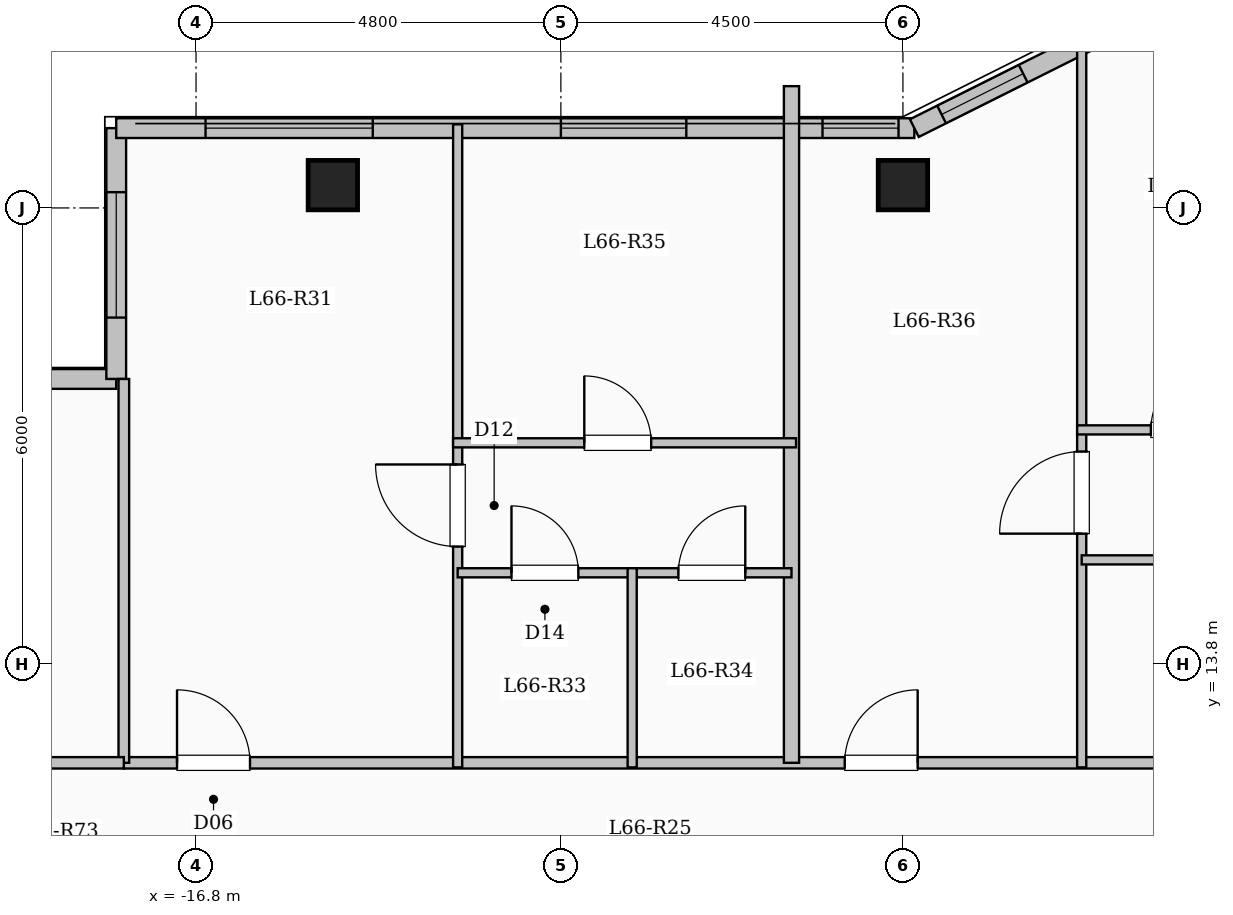
"""IFC4 building model, lengths in metres.
Left out: names, types, materials, properties, quantities, classifications, styles, units other than length and angle.
Written with IfcOpenShell. Run it as: python <this file> out.ifc"""

import sys

from ifc_helpers import new_model, si_unit, direction, frame, frame_2d, origin, origin_2d, place, context, subcontext, project, spatial, rectangle, extrude, element, fill, save


model = new_model("IFC4")
c1 = context("Model", 3, precision=1e-05, world=origin(), true_north=direction((0.0, 1.0)))
c2 = subcontext(c1, "Body", "Model", "MODEL_VIEW")
j1 = project(units=[si_unit("LENGTHUNIT", "METRE"), si_unit("PLANEANGLEUNIT", "RADIAN")], contexts=[c1])
p1 = place(None, origin())
s1 = spatial("IfcSite", under=j1, at=p1, CompositionType="ELEMENT")
p2 = place(p1, origin())
s2 = spatial("IfcBuilding", under=s1, at=p2, CompositionType="ELEMENT")
p3 = place(p2, frame((0.0, 0.0, 244.85)))
s3 = spatial("IfcBuildingStorey", under=s2, at=p3, CompositionType="ELEMENT", Elevation=244.85)
for number, where, z_axis, x_axis in (
    (1, (-15.0, 20.1, 0.0), (0.0, 0.0, 1.0), (1.0, 0.0, 0.0)),
    (2, (-7.5, 20.1, 0.0), (0.0, 0.0, 1.0), (1.0, 0.0, 0.0)),
):
    element("IfcColumn", number, at=place(p3, frame(where, z_axis=z_axis, x_axis=x_axis)), inside=s3, PredefinedType="COLUMN", context=c2, shape_type="SweptSolid", body=[
        extrude(rectangle(XDim=0.65, YDim=0.65, at=origin_2d()), origin(), (0.0, 0.0, 1.0), 3.35),
    ])
p4 = place(p3, frame((-22.65, 17.55, 0.0), z_axis=(0.0, 0.0, 1.0), x_axis=(1.0, 0.0, 0.0)))
e3 = element("IfcWall", 3, at=p4, inside=s3, PredefinedType="SOLIDWALL", context=c2, shape_type="SweptSolid", body=[
    extrude(rectangle(XDim=4.8, YDim=0.26, at=frame_2d((2.4, 0.0))), origin(), (0.0, 0.0, 1.0), 3.1),
])
p5 = place(p4, frame((1.425, 0.0, 0.9)))
e4 = element("IfcOpeningElement", 4, at=p5, cuts=e3, PredefinedType="OPENING", context=c2, shape_type="SweptSolid", body=[
    extrude(rectangle(XDim=2.0, YDim=1.7, at=frame_2d((1.0, 0.85))), frame((0.0, 0.14, 0.0), z_axis=(0.0, -1.0, 0.0), x_axis=(1.0, 0.0, 0.0)), (0.0, 0.0, 1.0), 0.28),
])
p6 = place(p3, frame((-17.85, 17.55, 0.0), z_axis=(0.0, 0.0, 1.0), x_axis=(0.0, 1.0, 0.0)))
e5 = element("IfcWall", 5, at=p6, inside=s3, PredefinedType="SOLIDWALL", context=c2, shape_type="SweptSolid", body=[
    extrude(rectangle(XDim=3.3, YDim=0.26, at=frame_2d((1.65, 0.0))), origin(), (0.0, 0.0, 1.0), 3.1),
])
p7 = place(p6, frame((0.808, 0.0, 0.9)))
e6 = element("IfcOpeningElement", 6, at=p7, cuts=e5, PredefinedType="OPENING", context=c2, shape_type="SweptSolid", body=[
    extrude(rectangle(XDim=1.65, YDim=1.6, at=frame_2d((0.825, 0.8))), frame((0.0, 0.14, 0.0), z_axis=(0.0, -1.0, 0.0), x_axis=(1.0, 0.0, 0.0)), (0.0, 0.0, 1.0), 0.28),
])
p8 = place(p3, frame((-17.85, 20.85, 0.0), z_axis=(0.0, 0.0, 1.0), x_axis=(1.0, 0.0, 0.0)))
e7 = element("IfcWall", 7, at=p8, inside=s3, PredefinedType="SOLIDWALL", context=c2, shape_type="SweptSolid", body=[
    extrude(rectangle(XDim=10.5, YDim=0.26, at=frame_2d((5.25, 0.0))), origin(), (0.0, 0.0, 1.0), 3.1),
])
p9 = place(p8, frame((1.175, 0.0, 0.9)))
e8 = element("IfcOpeningElement", 8, at=p9, cuts=e7, PredefinedType="OPENING", context=c2, shape_type="SweptSolid", body=[
    extrude(rectangle(XDim=2.2, YDim=1.75, at=frame_2d((1.1, 0.875))), frame((0.0, 0.14, 0.0), z_axis=(0.0, -1.0, 0.0), x_axis=(1.0, 0.0, 0.0)), (0.0, 0.0, 1.0), 0.28),
])
p10 = place(p8, frame((5.85, 0.0, 0.9)))
e9 = element("IfcOpeningElement", 9, at=p10, cuts=e7, PredefinedType="OPENING", context=c2, shape_type="SweptSolid", body=[
    extrude(rectangle(XDim=1.65, YDim=1.6, at=frame_2d((0.825, 0.8))), frame((0.0, 0.14, 0.0), z_axis=(0.0, -1.0, 0.0), x_axis=(1.0, 0.0, 0.0)), (0.0, 0.0, 1.0), 0.28),
])
p11 = place(p8, frame((9.292, 0.0, 0.95)))
e10 = element("IfcOpeningElement", 10, at=p11, cuts=e7, PredefinedType="OPENING", context=c2, shape_type="SweptSolid", body=[
    extrude(rectangle(XDim=1.0, YDim=1.5, at=frame_2d((0.5, 0.75))), frame((0.0, 0.14, 0.0), z_axis=(0.0, -1.0, 0.0), x_axis=(1.0, 0.0, 0.0)), (0.0, 0.0, 1.0), 0.28),
])
p12 = place(p3, frame((-7.35, 20.85, 0.0), z_axis=(0.0, 0.0, 1.0), x_axis=(0.894427191, 0.4472135955, 0.0)))
e11 = element("IfcWall", 11, at=p12, inside=s3, PredefinedType="SOLIDWALL", context=c2, shape_type="SweptSolid", body=[
    extrude(rectangle(XDim=3.354, YDim=0.26, at=frame_2d((1.677, 0.0))), origin(), (0.0, 0.0, 1.0), 3.1),
])
p13 = place(p12, frame((0.401, 0.0, 0.95)))
e12 = element("IfcOpeningElement", 12, at=p13, cuts=e11, PredefinedType="OPENING", context=c2, shape_type="SweptSolid", body=[
    extrude(rectangle(XDim=1.2, YDim=1.5, at=frame_2d((0.6, 0.75))), frame((0.0, 0.14, 0.0), z_axis=(0.0, -1.0, 0.0), x_axis=(1.0, 0.0, 0.0)), (0.0, 0.0, 1.0), 0.28),
])
p14 = place(p3, frame((-17.75, 12.5, 0.0), z_axis=(0.0, 0.0, 1.0), x_axis=(1.0, 0.0, 0.0)))
e13 = element("IfcWall", 13, at=p14, inside=s3, PredefinedType="PARTITIONING", context=c2, shape_type="SweptSolid", body=[
    extrude(rectangle(XDim=13.9, YDim=0.15, at=frame_2d((6.95, 0.0))), origin(), (0.0, 0.0, 1.0), 3.1),
])
p15 = place(p14, frame((0.7, 0.0, 0.0)))
e14 = element("IfcOpeningElement", 14, at=p15, cuts=e13, PredefinedType="OPENING", context=c2, shape_type="SweptSolid", body=[
    extrude(rectangle(XDim=0.96, YDim=2.15, at=frame_2d((0.48, 1.075))), frame((0.0, 0.085, 0.0), z_axis=(0.0, -1.0, 0.0), x_axis=(1.0, 0.0, 0.0)), (0.0, 0.0, 1.0), 0.17),
])
p16 = place(p14, frame((9.484, 0.0, 0.0)))
e15 = element("IfcOpeningElement", 15, at=p16, cuts=e13, PredefinedType="OPENING", context=c2, shape_type="SweptSolid", body=[
    extrude(rectangle(XDim=0.96, YDim=2.15, at=frame_2d((0.48, 1.075))), frame((0.0, 0.085, 0.0), z_axis=(0.0, -1.0, 0.0), x_axis=(1.0, 0.0, 0.0)), (0.0, 0.0, 1.0), 0.17),
])
p17 = place(p3, frame((-8.966, 12.5, 0.0), z_axis=(0.0, 0.0, 1.0), x_axis=(0.0, 1.0, 0.0)))
e16 = element("IfcWall", 16, at=p17, inside=s3, PredefinedType="SOLIDWALL", context=c2, shape_type="SweptSolid", body=[
    extrude(rectangle(XDim=8.902, YDim=0.2, at=frame_2d((4.451, 0.0))), origin(), (0.0, 0.0, 1.0), 3.1),
])
p18 = place(p3, frame((-13.358, 12.44, 0.0), z_axis=(0.0, 0.0, 1.0), x_axis=(0.0, 1.0, 0.0)))
e17 = element("IfcWall", 17, at=p18, inside=s3, PredefinedType="PARTITIONING", context=c2, shape_type="SweptSolid", body=[
    extrude(rectangle(XDim=8.46, YDim=0.12, at=frame_2d((4.23, 0.0))), origin(), (0.0, 0.0, 1.0), 3.1),
])
p19 = place(p18, frame((2.905, 0.0, 0.0)))
e18 = element("IfcOpeningElement", 18, at=p19, cuts=e17, PredefinedType="OPENING", context=c2, shape_type="SweptSolid", body=[
    extrude(rectangle(XDim=1.08, YDim=2.15, at=frame_2d((0.54, 1.075))), frame((0.0, 0.07, 0.0), z_axis=(0.0, -1.0, 0.0), x_axis=(1.0, 0.0, 0.0)), (0.0, 0.0, 1.0), 0.14),
])
p20 = place(p3, frame((-13.358, 15.0, 0.0), z_axis=(0.0, 0.0, 1.0), x_axis=(1.0, 0.0, 0.0)))
e19 = element("IfcWall", 19, at=p20, inside=s3, PredefinedType="PARTITIONING", context=c2, shape_type="SweptSolid", body=[
    extrude(rectangle(XDim=2.296, YDim=0.12, at=frame_2d((1.148, 0.0))), origin(), (0.0, 0.0, 1.0), 3.1),
])
p21 = place(p20, frame((0.708, 0.0, 0.0)))
e20 = element("IfcOpeningElement", 20, at=p21, cuts=e19, PredefinedType="OPENING", context=c2, shape_type="SweptSolid", body=[
    extrude(rectangle(XDim=0.88, YDim=2.1, at=frame_2d((0.44, 1.05))), frame((0.0, 0.07, 0.0), z_axis=(0.0, -1.0, 0.0), x_axis=(1.0, 0.0, 0.0)), (0.0, 0.0, 1.0), 0.14),
])
p22 = place(p3, frame((-11.062, 15.0, 0.0), z_axis=(0.0, 0.0, 1.0), x_axis=(1.0, 0.0, 0.0)))
e21 = element("IfcWall", 21, at=p22, inside=s3, PredefinedType="PARTITIONING", context=c2, shape_type="SweptSolid", body=[
    extrude(rectangle(XDim=2.096, YDim=0.12, at=frame_2d((1.048, 0.0))), origin(), (0.0, 0.0, 1.0), 3.1),
])
p23 = place(p22, frame((0.608, 0.0, 0.0)))
e22 = element("IfcOpeningElement", 22, at=p23, cuts=e21, PredefinedType="OPENING", context=c2, shape_type="SweptSolid", body=[
    extrude(rectangle(XDim=0.88, YDim=2.1, at=frame_2d((0.44, 1.05))), frame((0.0, 0.07, 0.0), z_axis=(0.0, -1.0, 0.0), x_axis=(1.0, 0.0, 0.0)), (0.0, 0.0, 1.0), 0.14),
])
p24 = place(p3, frame((-13.418, 16.71, 0.0), z_axis=(0.0, 0.0, 1.0), x_axis=(1.0, 0.0, 0.0)))
e23 = element("IfcWall", 23, at=p24, inside=s3, PredefinedType="PARTITIONING", context=c2, shape_type="SweptSolid", body=[
    extrude(rectangle(XDim=4.512, YDim=0.12, at=frame_2d((2.256, 0.0))), origin(), (0.0, 0.0, 1.0), 2.785),
])
p25 = place(p24, frame((1.726, 0.0, 0.0)))
e24 = element("IfcOpeningElement", 24, at=p25, cuts=e23, PredefinedType="OPENING", context=c2, shape_type="SweptSolid", body=[
    extrude(rectangle(XDim=0.88, YDim=2.1, at=frame_2d((0.44, 1.05))), frame((0.0, 0.07, 0.0), z_axis=(0.0, -1.0, 0.0), x_axis=(1.0, 0.0, 0.0)), (0.0, 0.0, 1.0), 0.14),
])
p26 = place(p3, frame((-11.062, 12.44, 0.0), z_axis=(0.0, 0.0, 1.0), x_axis=(0.0, 1.0, 0.0)))
e25 = element("IfcWall", 25, at=p26, inside=s3, PredefinedType="PARTITIONING", context=c2, shape_type="SweptSolid", body=[
    extrude(rectangle(XDim=2.62, YDim=0.12, at=frame_2d((1.31, 0.0))), origin(), (0.0, 0.0, 1.0), 3.1),
])
p27 = place(p3, frame((-5.148, 12.44, 0.0), z_axis=(0.0, 0.0, 1.0), x_axis=(0.0, 1.0, 0.0)))
e26 = element("IfcWall", 26, at=p27, inside=s3, PredefinedType="PARTITIONING", context=c2, shape_type="SweptSolid", body=[
    extrude(rectangle(XDim=9.903, YDim=0.12, at=frame_2d((4.952, 0.0))), origin(), (0.0, 0.0, 1.0), 3.1),
])
p28 = place(p27, frame((3.075, 0.0, 0.0)))
e27 = element("IfcOpeningElement", 27, at=p28, cuts=e26, PredefinedType="OPENING", context=c2, shape_type="SweptSolid", body=[
    extrude(rectangle(XDim=1.08, YDim=2.15, at=frame_2d((0.54, 1.075))), frame((0.0, 0.07, 0.0), z_axis=(0.0, -1.0, 0.0), x_axis=(1.0, 0.0, 0.0)), (0.0, 0.0, 1.0), 0.14),
])
p29 = place(p3, frame((-5.148, 15.17, 0.0), z_axis=(0.0, 0.0, 1.0), x_axis=(1.0, 0.0, 0.0)))
e28 = element("IfcWall", 28, at=p29, inside=s3, PredefinedType="PARTITIONING", context=c2, shape_type="SweptSolid", body=[
    extrude(rectangle(XDim=3.214, YDim=0.12, at=frame_2d((1.607, 0.0))), origin(), (0.0, 0.0, 1.0), 3.1),
])
p30 = place(p29, frame((1.167, 0.0, 0.0)))
e29 = element("IfcOpeningElement", 29, at=p30, cuts=e28, PredefinedType="OPENING", context=c2, shape_type="SweptSolid", body=[
    extrude(rectangle(XDim=0.88, YDim=2.1, at=frame_2d((0.44, 1.05))), frame((0.0, 0.07, 0.0), z_axis=(0.0, -1.0, 0.0), x_axis=(1.0, 0.0, 0.0)), (0.0, 0.0, 1.0), 0.14),
])
p31 = place(p3, frame((-5.208, 16.88, 0.0), z_axis=(0.0, 0.0, 1.0), x_axis=(1.0, 0.0, 0.0)))
e30 = element("IfcWall", 30, at=p31, inside=s3, PredefinedType="PARTITIONING", context=c2, shape_type="SweptSolid", body=[
    extrude(rectangle(XDim=5.818, YDim=0.12, at=frame_2d((2.909, 0.0))), origin(), (0.0, 0.0, 1.0), 2.785),
])
p32 = place(p31, frame((0.97, 0.0, 0.0)))
e31 = element("IfcOpeningElement", 31, at=p32, cuts=e30, PredefinedType="OPENING", context=c2, shape_type="SweptSolid", body=[
    extrude(rectangle(XDim=0.88, YDim=2.1, at=frame_2d((0.44, 1.05))), frame((0.0, 0.07, 0.0), z_axis=(0.0, -1.0, 0.0), x_axis=(1.0, 0.0, 0.0)), (0.0, 0.0, 1.0), 0.14),
])
p33 = place(p31, frame((3.788, 0.0, 0.0)))
e32 = element("IfcOpeningElement", 32, at=p33, cuts=e30, PredefinedType="OPENING", context=c2, shape_type="SweptSolid", body=[
    extrude(rectangle(XDim=0.88, YDim=2.1, at=frame_2d((0.44, 1.05))), frame((0.0, 0.07, 0.0), z_axis=(0.0, -1.0, 0.0), x_axis=(1.0, 0.0, 0.0)), (0.0, 0.0, 1.0), 0.14),
])
p34 = place(p3, frame((-17.75, 12.5, 0.0), z_axis=(0.0, 0.0, 1.0), x_axis=(0.0, 1.0, 0.0)))
e33 = element("IfcWall", 33, at=p34, inside=s3, PredefinedType="PARTITIONING", context=c2, shape_type="SweptSolid", body=[
    extrude(rectangle(XDim=5.05, YDim=0.14, at=frame_2d((2.525, 0.0))), origin(), (0.0, 0.0, 1.0), 3.1),
])
p35 = place(p3, frame((-22.68, 12.5, 0.0), z_axis=(0.0, 0.0, 1.0), x_axis=(1.0, 0.0, 0.0)))
e34 = element("IfcWall", 34, at=p35, inside=s3, PredefinedType="PARTITIONING", context=c2, shape_type="SweptSolid", body=[
    extrude(rectangle(XDim=4.93, YDim=0.15, at=frame_2d((2.465, 0.0))), origin(), (0.0, 0.0, 1.0), 3.1),
])
p36 = place(p35, frame((1.99, 0.0, 0.0)))
e35 = element("IfcOpeningElement", 35, at=p36, cuts=e34, PredefinedType="OPENING", context=c2, shape_type="SweptSolid", body=[
    extrude(rectangle(XDim=0.95, YDim=2.15, at=frame_2d((0.475, 1.075))), frame((0.0, 0.085, 0.0), z_axis=(0.0, -1.0, 0.0), x_axis=(1.0, 0.0, 0.0)), (0.0, 0.0, 1.0), 0.17),
])
p37 = place(p7, origin())
e36 = element("IfcWindow", 36, at=p37, inside=s3, PartitioningType="SINGLE_PANEL", PredefinedType="WINDOW", context=c2, shape_type="SweptSolid", body=[
    extrude(rectangle(XDim=1.65, YDim=1.6, at=frame_2d((0.825, 0.8))), frame((0.0, 0.03, 0.0), z_axis=(0.0, -1.0, 0.0), x_axis=(1.0, 0.0, 0.0)), (0.0, 0.0, 1.0), 0.06),
])
fill(e6, e36)
p38 = place(p9, origin())
e37 = element("IfcWindow", 37, at=p38, inside=s3, PartitioningType="SINGLE_PANEL", PredefinedType="WINDOW", context=c2, shape_type="SweptSolid", body=[
    extrude(rectangle(XDim=2.2, YDim=1.75, at=frame_2d((1.1, 0.875))), frame((0.0, 0.03, 0.0), z_axis=(0.0, -1.0, 0.0), x_axis=(1.0, 0.0, 0.0)), (0.0, 0.0, 1.0), 0.06),
])
fill(e8, e37)
p39 = place(p10, origin())
e38 = element("IfcWindow", 38, at=p39, inside=s3, PartitioningType="SINGLE_PANEL", PredefinedType="WINDOW", context=c2, shape_type="SweptSolid", body=[
    extrude(rectangle(XDim=1.65, YDim=1.6, at=frame_2d((0.825, 0.8))), frame((0.0, 0.03, 0.0), z_axis=(0.0, -1.0, 0.0), x_axis=(1.0, 0.0, 0.0)), (0.0, 0.0, 1.0), 0.06),
])
fill(e9, e38)
p40 = place(p11, origin())
e39 = element("IfcWindow", 39, at=p40, inside=s3, PartitioningType="SINGLE_PANEL", PredefinedType="WINDOW", context=c2, shape_type="SweptSolid", body=[
    extrude(rectangle(XDim=1.0, YDim=1.5, at=frame_2d((0.5, 0.75))), frame((0.0, 0.03, 0.0), z_axis=(0.0, -1.0, 0.0), x_axis=(1.0, 0.0, 0.0)), (0.0, 0.0, 1.0), 0.06),
])
fill(e10, e39)
p41 = place(p13, origin())
e40 = element("IfcWindow", 40, at=p41, inside=s3, PartitioningType="SINGLE_PANEL", PredefinedType="WINDOW", context=c2, shape_type="SweptSolid", body=[
    extrude(rectangle(XDim=1.2, YDim=1.5, at=frame_2d((0.6, 0.75))), frame((0.0, 0.03, 0.0), z_axis=(0.0, -1.0, 0.0), x_axis=(1.0, 0.0, 0.0)), (0.0, 0.0, 1.0), 0.06),
])
fill(e12, e40)
p42 = place(p15, origin())
e41 = element("IfcDoor", 41, at=p42, inside=s3, OperationType="SINGLE_SWING_LEFT", PredefinedType="DOOR", context=c2, shape_type="SweptSolid", body=[
    extrude(rectangle(XDim=0.96, YDim=2.15, at=frame_2d((0.48, 1.075))), frame((0.0, 0.025, 0.0), z_axis=(0.0, -1.0, 0.0), x_axis=(1.0, 0.0, 0.0)), (0.0, 0.0, 1.0), 0.05),
])
fill(e14, e41)
p43 = place(p19, origin())
e42 = element("IfcDoor", 42, at=p43, inside=s3, OperationType="SINGLE_SWING_RIGHT", PredefinedType="DOOR", context=c2, shape_type="SweptSolid", body=[
    extrude(rectangle(XDim=1.08, YDim=2.15, at=frame_2d((0.54, 1.075))), frame((0.0, 0.025, 0.0), z_axis=(0.0, -1.0, 0.0), x_axis=(1.0, 0.0, 0.0)), (0.0, 0.0, 1.0), 0.05),
])
fill(e18, e42)
p44 = place(p21, origin())
e43 = element("IfcDoor", 43, at=p44, inside=s3, OperationType="SINGLE_SWING_LEFT", PredefinedType="DOOR", context=c2, shape_type="SweptSolid", body=[
    extrude(rectangle(XDim=0.88, YDim=2.1, at=frame_2d((0.44, 1.05))), frame((0.0, 0.025, 0.0), z_axis=(0.0, -1.0, 0.0), x_axis=(1.0, 0.0, 0.0)), (0.0, 0.0, 1.0), 0.05),
])
fill(e20, e43)
p45 = place(p23, origin())
e44 = element("IfcDoor", 44, at=p45, inside=s3, OperationType="SINGLE_SWING_RIGHT", PredefinedType="DOOR", context=c2, shape_type="SweptSolid", body=[
    extrude(rectangle(XDim=0.88, YDim=2.1, at=frame_2d((0.44, 1.05))), frame((0.0, 0.025, 0.0), z_axis=(0.0, -1.0, 0.0), x_axis=(1.0, 0.0, 0.0)), (0.0, 0.0, 1.0), 0.05),
])
fill(e22, e44)
p46 = place(p25, origin())
e45 = element("IfcDoor", 45, at=p46, inside=s3, OperationType="SINGLE_SWING_LEFT", PredefinedType="DOOR", context=c2, shape_type="SweptSolid", body=[
    extrude(rectangle(XDim=0.88, YDim=2.1, at=frame_2d((0.44, 1.05))), frame((0.0, 0.025, 0.0), z_axis=(0.0, -1.0, 0.0), x_axis=(1.0, 0.0, 0.0)), (0.0, 0.0, 1.0), 0.05),
])
fill(e24, e45)
p47 = place(p16, origin())
e46 = element("IfcDoor", 46, at=p47, inside=s3, OperationType="SINGLE_SWING_RIGHT", PredefinedType="DOOR", context=c2, shape_type="SweptSolid", body=[
    extrude(rectangle(XDim=0.96, YDim=2.15, at=frame_2d((0.48, 1.075))), frame((0.0, 0.025, 0.0), z_axis=(0.0, -1.0, 0.0), x_axis=(1.0, 0.0, 0.0)), (0.0, 0.0, 1.0), 0.05),
])
fill(e15, e46)
p48 = place(p28, origin())
e47 = element("IfcDoor", 47, at=p48, inside=s3, OperationType="SINGLE_SWING_LEFT", PredefinedType="DOOR", context=c2, shape_type="SweptSolid", body=[
    extrude(rectangle(XDim=1.08, YDim=2.15, at=frame_2d((0.54, 1.075))), frame((0.0, 0.025, 0.0), z_axis=(0.0, -1.0, 0.0), x_axis=(1.0, 0.0, 0.0)), (0.0, 0.0, 1.0), 0.05),
])
fill(e27, e47)
p49 = place(p32, origin())
e48 = element("IfcDoor", 48, at=p49, inside=s3, OperationType="SINGLE_SWING_RIGHT", PredefinedType="DOOR", context=c2, shape_type="SweptSolid", body=[
    extrude(rectangle(XDim=0.88, YDim=2.1, at=frame_2d((0.44, 1.05))), frame((0.0, 0.025, 0.0), z_axis=(0.0, -1.0, 0.0), x_axis=(1.0, 0.0, 0.0)), (0.0, 0.0, 1.0), 0.05),
])
fill(e31, e48)
save(model, sys.argv[1])
